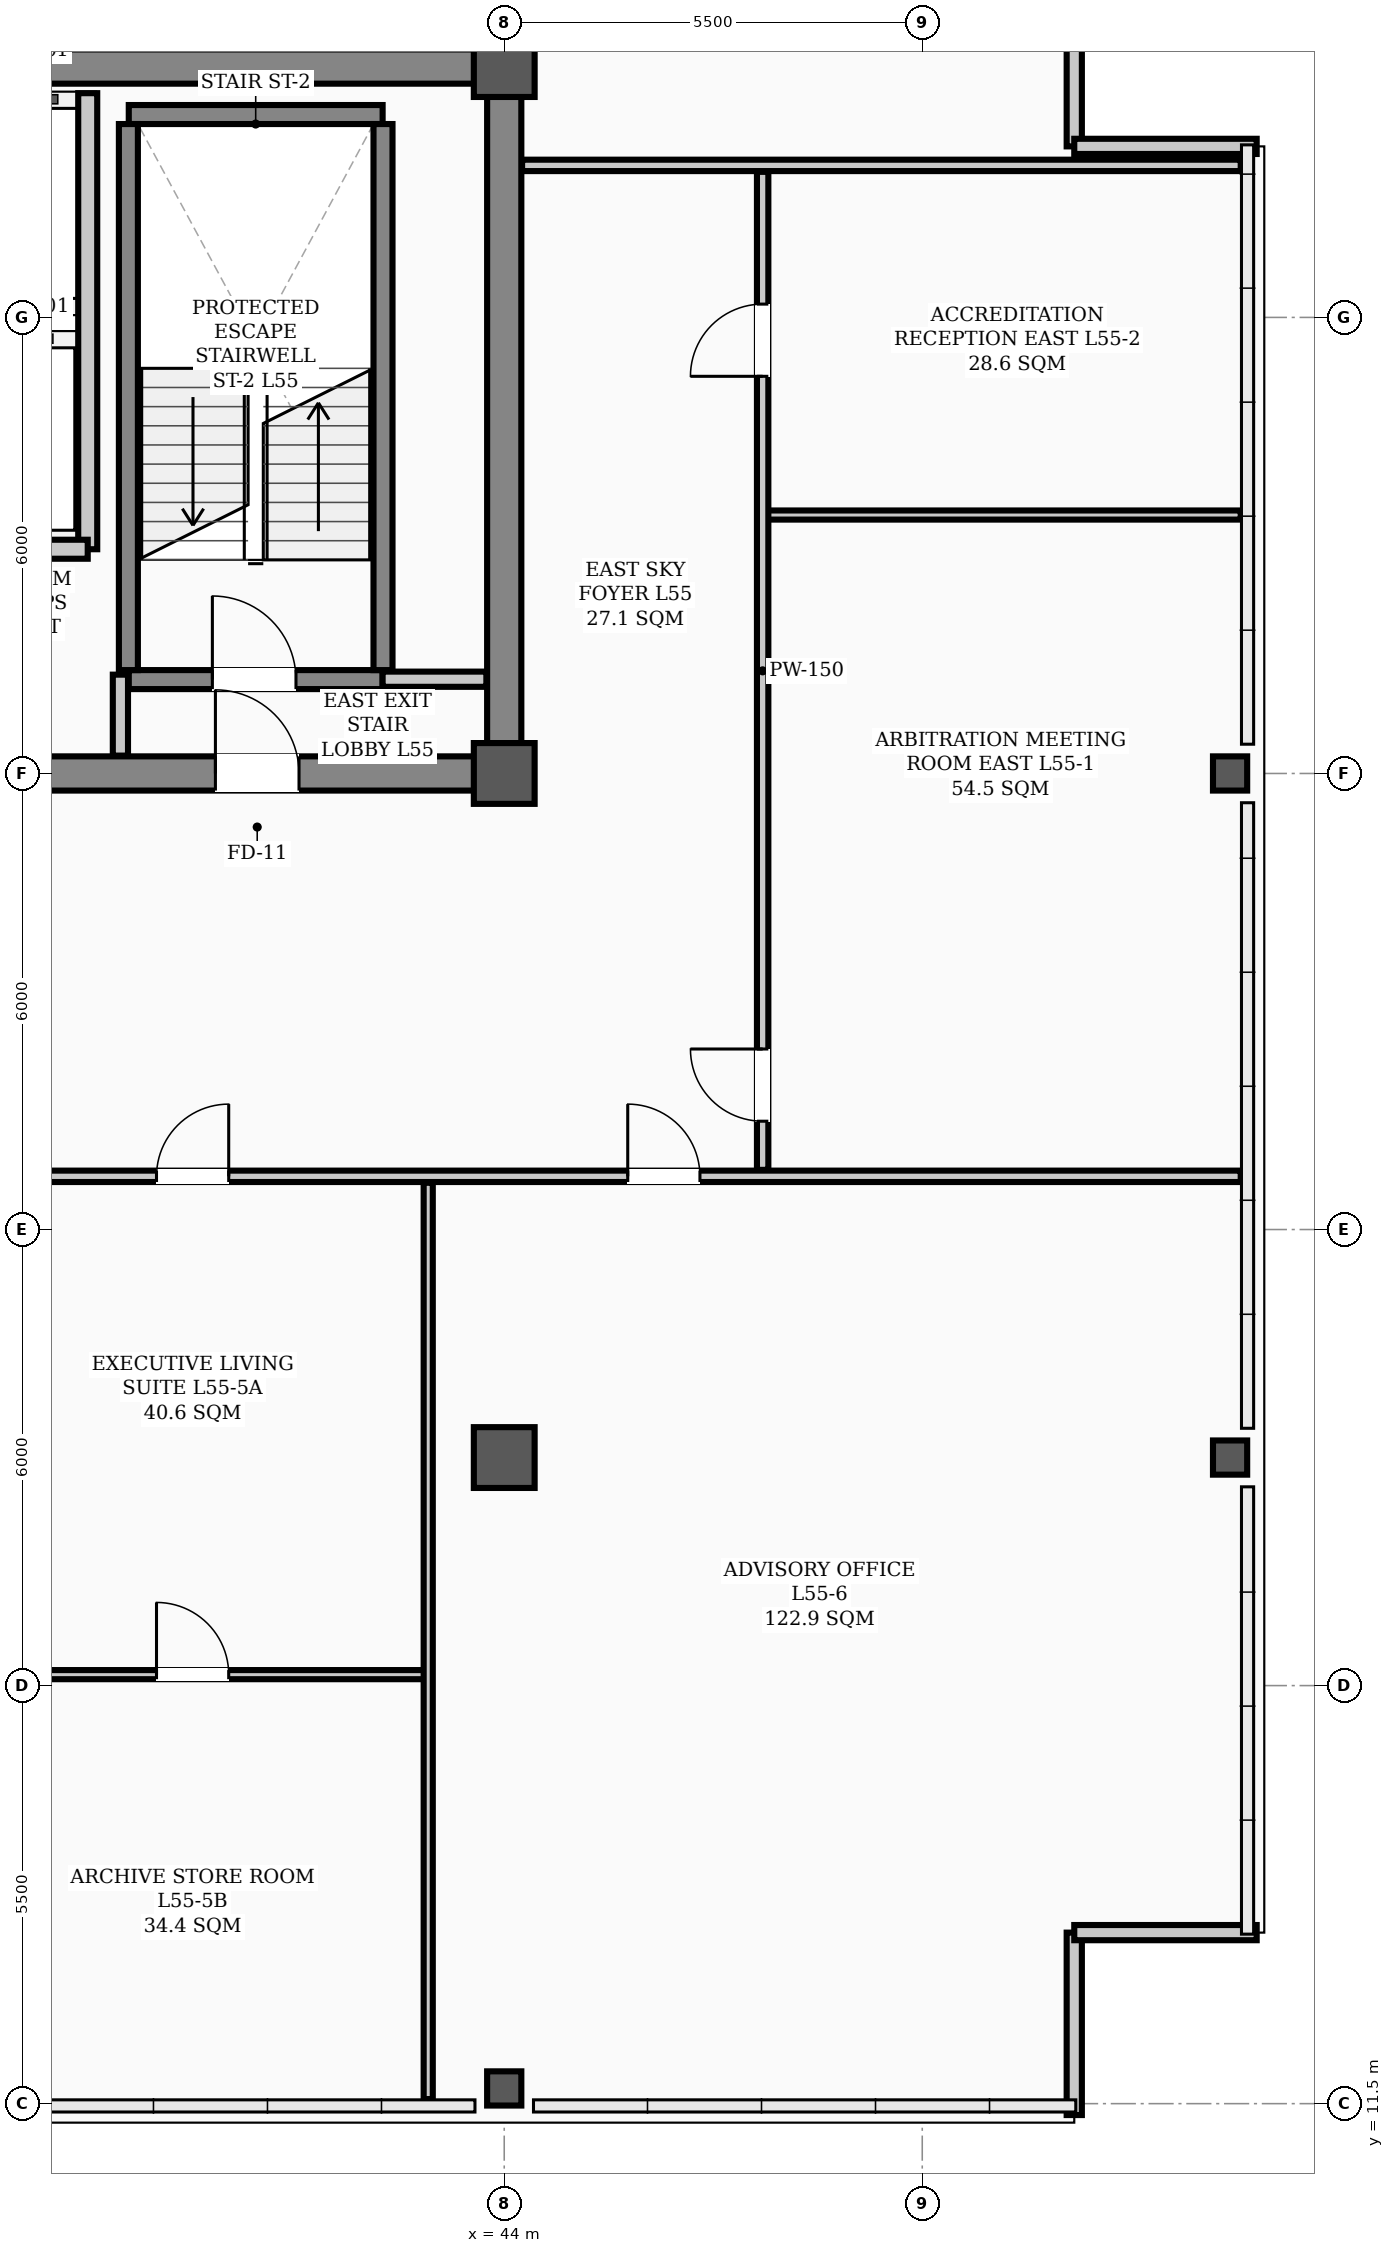
"""IFC4 building model, lengths in metres.
Left out: names, types, materials, properties, quantities, classifications, styles, units other than length and angle.
Written with IfcOpenShell. Run it as: python <this file> out.ifc"""

import sys

from ifc_helpers import new_model, si_unit, direction, frame, frame_2d, origin, origin_2d, place, context, subcontext, project, spatial, rectangle, hollow_rectangle, extrude, element, fill, save


model = new_model("IFC4")
c1 = context("Model", 3, precision=1e-05, world=origin(), true_north=direction((0.0, 1.0)))
c2 = subcontext(c1, "Body", "Model", "MODEL_VIEW")
j1 = project(units=[si_unit("LENGTHUNIT", "METRE"), si_unit("PLANEANGLEUNIT", "RADIAN")], contexts=[c1])
p1 = place(None, origin())
s1 = spatial("IfcSite", under=j1, at=p1, CompositionType="ELEMENT")
p2 = place(p1, origin())
s2 = spatial("IfcBuilding", under=s1, at=p2, CompositionType="ELEMENT")
p3 = place(p2, frame((0.0, 0.0, 222.8)))
s3 = spatial("IfcBuildingStorey", under=s2, at=p3, CompositionType="ELEMENT", Elevation=222.8)
for number, where, z_axis, x_axis in (
    (1, (44.0, 29.0, 0.0), (0.0, 0.0, 1.0), (1.0, 0.0, 0.0)),
    (2, (44.0, 38.3, 0.0), (0.0, 0.0, 1.0), (1.0, 0.0, 0.0)),
    (3, (44.0, 20.0, 0.0), (0.0, 0.0, 1.0), (1.0, 0.0, 0.0)),
):
    element("IfcColumn", number, at=place(p3, frame(where, z_axis=z_axis, x_axis=x_axis)), inside=s3, PredefinedType="COLUMN", context=c2, shape_type="SweptSolid", body=[
        extrude(hollow_rectangle(XDim=0.8, YDim=0.8, WallThickness=0.032, InnerFilletRadius=0.016, OuterFilletRadius=0.048, at=origin_2d()), origin(), (0.0, 0.0, 1.0), 3.9),
    ])
for number, where, z_axis, x_axis in (
    (4, (44.0, 11.7, 0.0), (0.0, 0.0, 1.0), (1.0, 0.0, 0.0)),
    (5, (53.55, 20.0, 0.0), (0.0, 0.0, 1.0), (1.0, 0.0, 0.0)),
    (6, (53.55, 29.0, 0.0), (0.0, 0.0, 1.0), (1.0, 0.0, 0.0)),
):
    element("IfcColumn", number, at=place(p3, frame(where, z_axis=z_axis, x_axis=x_axis)), inside=s3, PredefinedType="COLUMN", context=c2, shape_type="SweptSolid", body=[
        extrude(hollow_rectangle(XDim=0.45, YDim=0.45, WallThickness=0.022, InnerFilletRadius=0.022, OuterFilletRadius=0.044, at=origin_2d()), origin(), (0.0, 0.0, 1.0), 3.9),
    ])
for number, where, z_axis, x_axis in (
    (7, (51.5, 11.35, 0.0), (0.0, 0.0, 1.0), (0.0, 1.0, 0.0)),
    (8, (51.5, 13.75, 0.0), (0.0, 0.0, 1.0), (1.0, 0.0, 0.0)),
    (9, (51.5, 39.65, 0.0), (0.0, 0.0, 1.0), (0.0, -1.0, 0.0)),
    (10, (51.5, 37.25, 0.0), (0.0, 0.0, 1.0), (1.0, 0.0, 0.0)),
):
    element("IfcWall", number, at=place(p3, frame(where, z_axis=z_axis, x_axis=x_axis)), inside=s3, PredefinedType="PARAPET", context=c2, shape_type="SweptSolid", body=[
        extrude(rectangle(XDim=2.4, YDim=0.2, at=frame_2d((1.2, 0.0))), origin(), (0.0, 0.0, 1.0), 1.2),
    ])
p4 = place(p3, frame((13.5, 29.0, 0.0), z_axis=(0.0, 0.0, 1.0), x_axis=(1.0, 0.0, 0.0)))
e11 = element("IfcWall", 11, at=p4, inside=s3, PredefinedType="SHEAR", context=c2, shape_type="SweptSolid", body=[
    extrude(rectangle(XDim=30.5, YDim=0.45, at=frame_2d((15.25, 0.0))), origin(), (0.0, 0.0, 1.0), 3.72),
])
p5 = place(p4, frame((1.75, 0.0, 0.0)))
e12 = element("IfcOpeningElement", 12, at=p5, cuts=e11, PredefinedType="OPENING", context=c2, shape_type="SweptSolid", body=[
    extrude(rectangle(XDim=1.1, YDim=2.08, at=frame_2d((0.55, 1.04))), frame((0.0, 0.235, 0.0), z_axis=(0.0, -1.0, 0.0), x_axis=(1.0, 0.0, 0.0)), (0.0, 0.0, 1.0), 0.47),
])
p6 = place(p4, frame((26.7, 0.0, 0.0)))
e13 = element("IfcOpeningElement", 13, at=p6, cuts=e11, PredefinedType="OPENING", context=c2, shape_type="SweptSolid", body=[
    extrude(rectangle(XDim=1.1, YDim=2.08, at=frame_2d((0.55, 1.04))), frame((0.0, 0.235, 0.0), z_axis=(0.0, -1.0, 0.0), x_axis=(1.0, 0.0, 0.0)), (0.0, 0.0, 1.0), 0.47),
])
p7 = place(p4, frame((6.8, 0.0, 0.0)))
e14 = element("IfcOpeningElement", 14, at=p7, cuts=e11, PredefinedType="OPENING", context=c2, shape_type="SweptSolid", body=[
    extrude(rectangle(XDim=1.1, YDim=2.08, at=frame_2d((0.55, 1.04))), frame((0.0, 0.235, 0.0), z_axis=(0.0, -1.0, 0.0), x_axis=(1.0, 0.0, 0.0)), (0.0, 0.0, 1.0), 0.47),
])
p8 = place(p4, frame((13.2, 0.0, 0.0)))
e15 = element("IfcOpeningElement", 15, at=p8, cuts=e11, PredefinedType="OPENING", context=c2, shape_type="SweptSolid", body=[
    extrude(rectangle(XDim=1.6, YDim=2.08, at=frame_2d((0.8, 1.04))), frame((0.0, 0.235, 0.0), z_axis=(0.0, -1.0, 0.0), x_axis=(1.0, 0.0, 0.0)), (0.0, 0.0, 1.0), 0.47),
])
p9 = place(p4, frame((19.6, 0.0, 0.0)))
e16 = element("IfcOpeningElement", 16, at=p9, cuts=e11, PredefinedType="OPENING", context=c2, shape_type="SweptSolid", body=[
    extrude(rectangle(XDim=0.9, YDim=2.08, at=frame_2d((0.45, 1.04))), frame((0.0, 0.235, 0.0), z_axis=(0.0, -1.0, 0.0), x_axis=(1.0, 0.0, 0.0)), (0.0, 0.0, 1.0), 0.47),
])
p10 = place(p4, frame((21.6, 0.0, 0.0)))
e17 = element("IfcOpeningElement", 17, at=p10, cuts=e11, PredefinedType="OPENING", context=c2, shape_type="SweptSolid", body=[
    extrude(rectangle(XDim=0.9, YDim=2.08, at=frame_2d((0.45, 1.04))), frame((0.0, 0.235, 0.0), z_axis=(0.0, -1.0, 0.0), x_axis=(1.0, 0.0, 0.0)), (0.0, 0.0, 1.0), 0.47),
])
p11 = place(p3, frame((13.5, 38.3, 0.0), z_axis=(0.0, 0.0, 1.0), x_axis=(1.0, 0.0, 0.0)))
e18 = element("IfcWall", 18, at=p11, inside=s3, PredefinedType="SHEAR", context=c2, shape_type="SweptSolid", body=[
    extrude(rectangle(XDim=30.5, YDim=0.45, at=frame_2d((15.25, 0.0))), origin(), (0.0, 0.0, 1.0), 3.72),
])
p12 = place(p3, frame((44.0, 29.35, 0.0), z_axis=(0.0, 0.0, 1.0), x_axis=(0.0, 1.0, 0.0)))
e19 = element("IfcWall", 19, at=p12, inside=s3, PredefinedType="SHEAR", context=c2, shape_type="SweptSolid", body=[
    extrude(rectangle(XDim=8.6, YDim=0.45, at=frame_2d((4.3, 0.0))), origin(), (0.0, 0.0, 1.0), 3.72),
])
p13 = place(p3, frame((39.06, 30.235, 0.0), z_axis=(0.0, 0.0, 1.0), x_axis=(1.0, 0.0, 0.0)))
e20 = element("IfcWall", 20, at=p13, inside=s3, PredefinedType="STANDARD", context=c2, shape_type="SweptSolid", body=[
    extrude(rectangle(XDim=3.34, YDim=0.25, at=frame_2d((1.67, 0.0))), origin(), (0.0, 0.0, 1.0), 3.72),
])
p14 = place(p13, frame((1.1, 0.0, 0.0)))
e21 = element("IfcOpeningElement", 21, at=p14, cuts=e20, PredefinedType="OPENING", context=c2, shape_type="SweptSolid", body=[
    extrude(rectangle(XDim=1.1, YDim=2.08, at=frame_2d((0.55, 1.04))), frame((0.0, 0.135, 0.0), z_axis=(0.0, -1.0, 0.0), x_axis=(1.0, 0.0, 0.0)), (0.0, 0.0, 1.0), 0.27),
])
p15 = place(p3, frame((39.06, 37.669, 0.0), z_axis=(0.0, 0.0, 1.0), x_axis=(1.0, 0.0, 0.0)))
e22 = element("IfcWall", 22, at=p15, inside=s3, PredefinedType="STANDARD", context=c2, shape_type="SweptSolid", body=[
    extrude(rectangle(XDim=3.34, YDim=0.25, at=frame_2d((1.67, 0.0))), origin(), (0.0, 0.0, 1.0), 3.72),
])
for number, where, z_axis, x_axis in (
    (23, (39.055, 30.36, 0.0), (0.0, 0.0, 1.0), (0.0, 1.0, 0.0)),
    (24, (42.405, 30.36, 0.0), (0.0, 0.0, 1.0), (0.0, 1.0, 0.0)),
):
    element("IfcWall", number, at=place(p3, frame(where, z_axis=z_axis, x_axis=x_axis)), inside=s3, PredefinedType="STANDARD", context=c2, shape_type="SweptSolid", body=[
        extrude(rectangle(XDim=7.184, YDim=0.25, at=frame_2d((3.592, 0.0))), origin(), (0.0, 0.0, 1.0), 3.72),
    ])
p16 = place(p3, frame((38.52, 31.95, 0.0), z_axis=(0.0, 0.0, 1.0), x_axis=(0.0, 1.0, 0.0)))
e25 = element("IfcWall", 25, at=p16, inside=s3, PredefinedType="STANDARD", context=c2, shape_type="SweptSolid", body=[
    extrude(rectangle(XDim=6.0, YDim=0.25, at=frame_2d((3.0, 0.0))), origin(), (0.0, 0.0, 1.0), 3.48),
])
p17 = place(p3, frame((36.62, 31.95, 0.0), z_axis=(0.0, 0.0, 1.0), x_axis=(1.0, 0.0, 0.0)))
e26 = element("IfcWall", 26, at=p17, inside=s3, PredefinedType="STANDARD", context=c2, shape_type="SweptSolid", body=[
    extrude(rectangle(XDim=1.9, YDim=0.25, at=frame_2d((0.95, 0.0))), origin(), (0.0, 0.0, 1.0), 3.48),
])
p18 = place(p3, frame((42.4, 30.24, 0.0), z_axis=(0.0, 0.0, 1.0), x_axis=(1.0, 0.0, 0.0)))
e27 = element("IfcWall", 27, at=p18, inside=s3, PredefinedType="STANDARD", context=c2, shape_type="SweptSolid", body=[
    extrude(rectangle(XDim=1.365, YDim=0.2, at=frame_2d((0.683, 0.0))), origin(), (0.0, 0.0, 1.0), 3.2),
])
p19 = place(p3, frame((10.31, 23.7, 0.0), z_axis=(0.0, 0.0, 1.0), x_axis=(1.0, 0.0, 0.0)))
e28 = element("IfcWall", 28, at=p19, inside=s3, PredefinedType="PARTITIONING", context=c2, shape_type="SweptSolid", body=[
    extrude(rectangle(XDim=43.38, YDim=0.15, at=frame_2d((21.69, 0.0))), origin(), (0.0, 0.0, 1.0), 3.2),
])
p20 = place(p19, frame((0.575, 0.0, 0.0)))
e29 = element("IfcOpeningElement", 29, at=p20, cuts=e28, PredefinedType="OPENING", context=c2, shape_type="SweptSolid", body=[
    extrude(rectangle(XDim=0.95, YDim=2.08, at=frame_2d((0.475, 1.04))), frame((0.0, 0.085, 0.0), z_axis=(0.0, -1.0, 0.0), x_axis=(1.0, 0.0, 0.0)), (0.0, 0.0, 1.0), 0.17),
])
p21 = place(p19, frame((9.615, 0.0, 0.0)))
e30 = element("IfcOpeningElement", 30, at=p21, cuts=e28, PredefinedType="OPENING", context=c2, shape_type="SweptSolid", body=[
    extrude(rectangle(XDim=0.95, YDim=2.08, at=frame_2d((0.475, 1.04))), frame((0.0, 0.085, 0.0), z_axis=(0.0, -1.0, 0.0), x_axis=(1.0, 0.0, 0.0)), (0.0, 0.0, 1.0), 0.17),
])
p22 = place(p19, frame((16.215, 0.0, 0.0)))
e31 = element("IfcOpeningElement", 31, at=p22, cuts=e28, PredefinedType="OPENING", context=c2, shape_type="SweptSolid", body=[
    extrude(rectangle(XDim=0.95, YDim=2.08, at=frame_2d((0.475, 1.04))), frame((0.0, 0.085, 0.0), z_axis=(0.0, -1.0, 0.0), x_axis=(1.0, 0.0, 0.0)), (0.0, 0.0, 1.0), 0.17),
])
p23 = place(p19, frame((22.815, 0.0, 0.0)))
e32 = element("IfcOpeningElement", 32, at=p23, cuts=e28, PredefinedType="OPENING", context=c2, shape_type="SweptSolid", body=[
    extrude(rectangle(XDim=0.95, YDim=2.08, at=frame_2d((0.475, 1.04))), frame((0.0, 0.085, 0.0), z_axis=(0.0, -1.0, 0.0), x_axis=(1.0, 0.0, 0.0)), (0.0, 0.0, 1.0), 0.17),
])
p24 = place(p19, frame((29.115, 0.0, 0.0)))
e33 = element("IfcOpeningElement", 33, at=p24, cuts=e28, PredefinedType="OPENING", context=c2, shape_type="SweptSolid", body=[
    extrude(rectangle(XDim=0.95, YDim=2.08, at=frame_2d((0.475, 1.04))), frame((0.0, 0.085, 0.0), z_axis=(0.0, -1.0, 0.0), x_axis=(1.0, 0.0, 0.0)), (0.0, 0.0, 1.0), 0.17),
])
p25 = place(p19, frame((35.315, 0.0, 0.0)))
e34 = element("IfcOpeningElement", 34, at=p25, cuts=e28, PredefinedType="OPENING", context=c2, shape_type="SweptSolid", body=[
    extrude(rectangle(XDim=0.95, YDim=2.08, at=frame_2d((0.475, 1.04))), frame((0.0, 0.085, 0.0), z_axis=(0.0, -1.0, 0.0), x_axis=(1.0, 0.0, 0.0)), (0.0, 0.0, 1.0), 0.17),
])
p26 = place(p3, frame((44.235, 37.0, 0.0), z_axis=(0.0, 0.0, 1.0), x_axis=(1.0, 0.0, 0.0)))
e35 = element("IfcWall", 35, at=p26, inside=s3, PredefinedType="PARTITIONING", context=c2, shape_type="SweptSolid", body=[
    extrude(rectangle(XDim=9.455, YDim=0.15, at=frame_2d((4.728, 0.0))), origin(), (0.0, 0.0, 1.0), 3.2),
])
p27 = place(p3, frame((36.8, 17.144, 0.0), z_axis=(0.0, 0.0, 1.0), x_axis=(1.0, 0.0, 0.0)))
e36 = element("IfcWall", 36, at=p27, inside=s3, PredefinedType="PARTITIONING", context=c2, shape_type="SweptSolid", body=[
    extrude(rectangle(XDim=6.2, YDim=0.12, at=frame_2d((3.1, 0.0))), origin(), (0.0, 0.0, 1.0), 3.2),
])
p28 = place(p27, frame((2.625, 0.0, 0.0)))
e37 = element("IfcOpeningElement", 37, at=p28, cuts=e36, PredefinedType="OPENING", context=c2, shape_type="SweptSolid", body=[
    extrude(rectangle(XDim=0.95, YDim=2.08, at=frame_2d((0.475, 1.04))), frame((0.0, 0.07, 0.0), z_axis=(0.0, -1.0, 0.0), x_axis=(1.0, 0.0, 0.0)), (0.0, 0.0, 1.0), 0.14),
])
p29 = place(p3, frame((47.4, 32.4, 0.0), z_axis=(0.0, 0.0, 1.0), x_axis=(1.0, 0.0, 0.0)))
e38 = element("IfcWall", 38, at=p29, inside=s3, PredefinedType="PARTITIONING", context=c2, shape_type="SweptSolid", body=[
    extrude(rectangle(XDim=6.29, YDim=0.12, at=frame_2d((3.145, 0.0))), origin(), (0.0, 0.0, 1.0), 3.72),
])
p30 = place(p3, frame((38.95, 29.235, 0.0), z_axis=(0.0, 0.0, 1.0), x_axis=(0.0, 1.0, 0.0)))
e39 = element("IfcWall", 39, at=p30, inside=s3, PredefinedType="STANDARD", context=c2, shape_type="SweptSolid", body=[
    extrude(rectangle(XDim=1.065, YDim=0.2, at=frame_2d((0.532, 0.0))), origin(), (0.0, 0.0, 1.0), 3.35),
])
p31 = place(p3, frame((47.4, 23.785, 0.0), z_axis=(0.0, 0.0, 1.0), x_axis=(0.0, 1.0, 0.0)))
e40 = element("IfcWall", 40, at=p31, inside=s3, PredefinedType="PARTITIONING", context=c2, shape_type="SweptSolid", body=[
    extrude(rectangle(XDim=13.13, YDim=0.15, at=frame_2d((6.565, 0.0))), origin(), (0.0, 0.0, 1.0), 3.1),
])
p32 = place(p31, frame((0.64, 0.0, 0.0)))
e41 = element("IfcOpeningElement", 41, at=p32, cuts=e40, PredefinedType="OPENING", context=c2, shape_type="SweptSolid", body=[
    extrude(rectangle(XDim=0.95, YDim=2.08, at=frame_2d((0.475, 1.04))), frame((0.0, 0.085, 0.0), z_axis=(0.0, -1.0, 0.0), x_axis=(1.0, 0.0, 0.0)), (0.0, 0.0, 1.0), 0.17),
])
p33 = place(p31, frame((10.44, 0.0, 0.0)))
e42 = element("IfcOpeningElement", 42, at=p33, cuts=e40, PredefinedType="OPENING", context=c2, shape_type="SweptSolid", body=[
    extrude(rectangle(XDim=0.95, YDim=2.08, at=frame_2d((0.475, 1.04))), frame((0.0, 0.085, 0.0), z_axis=(0.0, -1.0, 0.0), x_axis=(1.0, 0.0, 0.0)), (0.0, 0.0, 1.0), 0.17),
])
p34 = place(p3, frame((43.0, 11.56, 0.0), z_axis=(0.0, 0.0, 1.0), x_axis=(0.0, 1.0, 0.0)))
e43 = element("IfcWall", 43, at=p34, inside=s3, PredefinedType="PARTITIONING", context=c2, shape_type="SweptSolid", body=[
    extrude(rectangle(XDim=12.055, YDim=0.12, at=frame_2d((6.027, 0.0))), origin(), (0.0, 0.0, 1.0), 3.1),
])
p35 = place(p14, origin())
e44 = element("IfcDoor", 44, at=p35, inside=s3, OperationType="SINGLE_SWING_LEFT", PredefinedType="DOOR", context=c2, shape_type="SweptSolid", body=[
    extrude(rectangle(XDim=1.1, YDim=2.08, at=frame_2d((0.55, 1.04))), frame((0.0, 0.025, 0.0), z_axis=(0.0, -1.0, 0.0), x_axis=(1.0, 0.0, 0.0)), (0.0, 0.0, 1.0), 0.05),
])
fill(e21, e44)
p36 = place(p6, origin())
e45 = element("IfcDoor", 45, at=p36, inside=s3, OperationType="SINGLE_SWING_LEFT", PredefinedType="DOOR", context=c2, shape_type="SweptSolid", body=[
    extrude(rectangle(XDim=1.1, YDim=2.08, at=frame_2d((0.55, 1.04))), frame((0.0, 0.025, 0.0), z_axis=(0.0, -1.0, 0.0), x_axis=(1.0, 0.0, 0.0)), (0.0, 0.0, 1.0), 0.05),
])
fill(e13, e45)
p37 = place(p28, origin())
e46 = element("IfcDoor", 46, at=p37, inside=s3, OperationType="SINGLE_SWING_LEFT", PredefinedType="DOOR", context=c2, shape_type="SweptSolid", body=[
    extrude(rectangle(XDim=0.95, YDim=2.08, at=frame_2d((0.475, 1.04))), frame((0.0, 0.025, 0.0), z_axis=(0.0, -1.0, 0.0), x_axis=(1.0, 0.0, 0.0)), (0.0, 0.0, 1.0), 0.05),
])
fill(e37, e46)
p38 = place(p24, origin())
e47 = element("IfcDoor", 47, at=p38, inside=s3, OperationType="SINGLE_SWING_RIGHT", PredefinedType="DOOR", context=c2, shape_type="SweptSolid", body=[
    extrude(rectangle(XDim=0.95, YDim=2.08, at=frame_2d((0.475, 1.04))), frame((0.0, 0.025, 0.0), z_axis=(0.0, -1.0, 0.0), x_axis=(1.0, 0.0, 0.0)), (0.0, 0.0, 1.0), 0.05),
])
fill(e33, e47)
p39 = place(p25, origin())
e48 = element("IfcDoor", 48, at=p39, inside=s3, OperationType="SINGLE_SWING_LEFT", PredefinedType="DOOR", context=c2, shape_type="SweptSolid", body=[
    extrude(rectangle(XDim=0.95, YDim=2.08, at=frame_2d((0.475, 1.04))), frame((0.0, 0.025, 0.0), z_axis=(0.0, -1.0, 0.0), x_axis=(1.0, 0.0, 0.0)), (0.0, 0.0, 1.0), 0.05),
])
fill(e34, e48)
p40 = place(p32, origin())
e49 = element("IfcDoor", 49, at=p40, inside=s3, OperationType="SINGLE_SWING_RIGHT", PredefinedType="DOOR", context=c2, shape_type="SweptSolid", body=[
    extrude(rectangle(XDim=0.95, YDim=2.08, at=frame_2d((0.475, 1.04))), frame((0.0, 0.025, 0.0), z_axis=(0.0, -1.0, 0.0), x_axis=(1.0, 0.0, 0.0)), (0.0, 0.0, 1.0), 0.05),
])
fill(e41, e49)
p41 = place(p33, origin())
e50 = element("IfcDoor", 50, at=p41, inside=s3, OperationType="SINGLE_SWING_LEFT", PredefinedType="DOOR", context=c2, shape_type="SweptSolid", body=[
    extrude(rectangle(XDim=0.95, YDim=2.08, at=frame_2d((0.475, 1.04))), frame((0.0, 0.025, 0.0), z_axis=(0.0, -1.0, 0.0), x_axis=(1.0, 0.0, 0.0)), (0.0, 0.0, 1.0), 0.05),
])
fill(e42, e50)
save(model, sys.argv[1])
